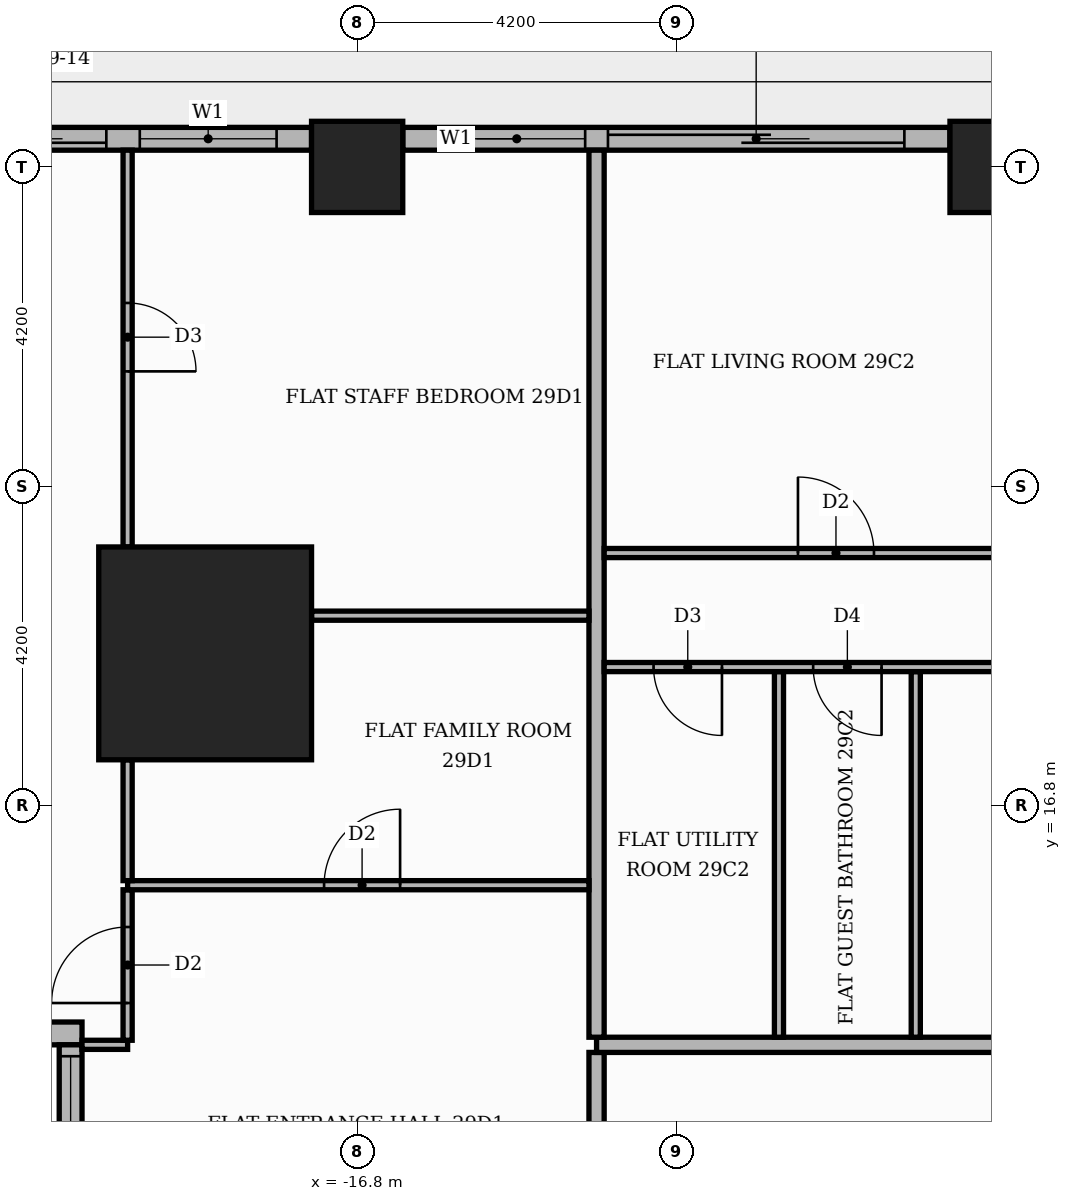
"""IFC4 building model, lengths in metres.
Left out: names, types, materials, properties, quantities, classifications, styles, units other than length and angle.
Written with IfcOpenShell. Run it as: python <this file> out.ifc"""

import sys

from ifc_helpers import new_model, si_unit, direction, frame, frame_2d, origin, origin_2d, place, context, subcontext, project, spatial, rectangle, extrude, element, fill, save


model = new_model("IFC4")
c1 = context("Model", 3, precision=1e-05, world=origin(), true_north=direction((0.0, 1.0)))
c2 = subcontext(c1, "Body", "Model", "MODEL_VIEW")
j1 = project(units=[si_unit("LENGTHUNIT", "METRE"), si_unit("PLANEANGLEUNIT", "RADIAN")], contexts=[c1])
p1 = place(None, origin())
s1 = spatial("IfcSite", under=j1, at=p1, CompositionType="ELEMENT")
p2 = place(p1, origin())
s2 = spatial("IfcBuilding", under=s1, at=p2, CompositionType="ELEMENT")
p3 = place(p2, frame((0.0, 0.0, 122.1)))
s3 = spatial("IfcBuildingStorey", under=s2, at=p3, CompositionType="ELEMENT", Elevation=122.1)
p4 = place(p3, frame((-18.8, 18.8, 0.0), z_axis=(0.0, 0.0, 1.0), x_axis=(1.0, 0.0, 0.0)))
e1 = element("IfcColumn", 1, at=p4, inside=s3, PredefinedType="COLUMN", context=c2, shape_type="SweptSolid", body=[
    extrude(rectangle(XDim=2.8, YDim=2.8, at=origin_2d()), origin(), (0.0, 0.0, 1.0), 3.9),
])
for number, where, z_axis, x_axis in (
    (2, (-8.4, 25.2, 0.0), (0.0, 0.0, 1.0), (1.0, 0.0, 0.0)),
    (3, (-16.8, 25.2, 0.0), (0.0, 0.0, 1.0), (1.0, 0.0, 0.0)),
):
    element("IfcColumn", number, at=place(p3, frame(where, z_axis=z_axis, x_axis=x_axis)), inside=s3, PredefinedType="COLUMN", context=c2, shape_type="SweptSolid", body=[
        extrude(rectangle(XDim=1.2, YDim=1.2, at=origin_2d()), origin(), (0.0, 0.0, 1.0), 3.9),
    ])
p5 = place(p3, frame((-9.0, 25.57, 0.0), z_axis=(0.0, 0.0, 1.0), x_axis=(-1.0, 0.0, 0.0)))
e4 = element("IfcWall", 4, at=p5, inside=s3, PredefinedType="STANDARD", context=c2, shape_type="SweptSolid", body=[
    extrude(rectangle(XDim=7.2, YDim=0.3, at=frame_2d((3.6, 0.0))), origin(), (0.0, 0.0, 1.0), 3.4),
])
p6 = place(p5, frame((0.6, 0.0, 0.0)))
e5 = element("IfcOpeningElement", 5, at=p6, cuts=e4, PredefinedType="OPENING", context=c2, shape_type="SweptSolid", body=[
    extrude(rectangle(XDim=3.9, YDim=2.4, at=frame_2d((1.95, 1.2))), frame((0.0, 0.16, 0.0), z_axis=(0.0, -1.0, 0.0), x_axis=(1.0, 0.0, 0.0)), (0.0, 0.0, 1.0), 0.32),
])
p7 = place(p5, frame((4.8, 0.0, 0.9)))
e6 = element("IfcOpeningElement", 6, at=p7, cuts=e4, PredefinedType="OPENING", context=c2, shape_type="SweptSolid", body=[
    extrude(rectangle(XDim=1.8, YDim=2.1, at=frame_2d((0.9, 1.05))), frame((0.0, 0.16, 0.0), z_axis=(0.0, -1.0, 0.0), x_axis=(1.0, 0.0, 0.0)), (0.0, 0.0, 1.0), 0.32),
])
p8 = place(p3, frame((-17.4, 25.57, 0.0), z_axis=(0.0, 0.0, 1.0), x_axis=(-1.0, 0.0, 0.0)))
e7 = element("IfcWall", 7, at=p8, inside=s3, PredefinedType="STANDARD", context=c2, shape_type="SweptSolid", body=[
    extrude(rectangle(XDim=4.82, YDim=0.3, at=frame_2d((2.41, 0.0))), origin(), (0.0, 0.0, 1.0), 3.4),
])
p9 = place(p8, frame((2.7, 0.0, 0.0)))
e8 = element("IfcOpeningElement", 8, at=p9, cuts=e7, PredefinedType="OPENING", context=c2, shape_type="SweptSolid", body=[
    extrude(rectangle(XDim=1.8, YDim=2.4, at=frame_2d((0.9, 1.2))), frame((0.0, 0.16, 0.0), z_axis=(0.0, -1.0, 0.0), x_axis=(1.0, 0.0, 0.0)), (0.0, 0.0, 1.0), 0.32),
])
p10 = place(p8, frame((0.46, 0.0, 0.9)))
e9 = element("IfcOpeningElement", 9, at=p10, cuts=e7, PredefinedType="OPENING", context=c2, shape_type="SweptSolid", body=[
    extrude(rectangle(XDim=1.8, YDim=2.1, at=frame_2d((0.9, 1.05))), frame((0.0, 0.16, 0.0), z_axis=(0.0, -1.0, 0.0), x_axis=(1.0, 0.0, 0.0)), (0.0, 0.0, 1.0), 0.32),
])
p11 = place(p3, frame((-25.42, 13.8, 0.0), z_axis=(0.0, 0.0, 1.0), x_axis=(1.0, 0.0, 0.0)))
e10 = element("IfcWall", 10, at=p11, inside=s3, PredefinedType="STANDARD", context=c2, shape_type="SweptSolid", body=[
    extrude(rectangle(XDim=5.0, YDim=0.3, at=frame_2d((2.5, 0.0))), origin(), (0.0, 0.0, 1.0), 3.4),
])
p12 = place(p11, frame((1.42, 0.0, 0.9)))
e11 = element("IfcOpeningElement", 11, at=p12, cuts=e10, PredefinedType="OPENING", context=c2, shape_type="SweptSolid", body=[
    extrude(rectangle(XDim=1.8, YDim=2.1, at=frame_2d((0.9, 1.05))), frame((0.0, 0.16, 0.0), z_axis=(0.0, -1.0, 0.0), x_axis=(1.0, 0.0, 0.0)), (0.0, 0.0, 1.0), 0.32),
])
p13 = place(p3, frame((-20.57, 13.65, 0.0), z_axis=(0.0, 0.0, 1.0), x_axis=(0.0, -1.0, 0.0)))
e12 = element("IfcWall", 12, at=p13, inside=s3, PredefinedType="STANDARD", context=c2, shape_type="SweptSolid", body=[
    extrude(rectangle(XDim=27.6, YDim=0.3, at=frame_2d((13.8, 0.0))), origin(), (0.0, 0.0, 1.0), 3.4),
])
p14 = place(p13, frame((0.15, 0.0, 0.9)))
e13 = element("IfcOpeningElement", 13, at=p14, cuts=e12, PredefinedType="OPENING", context=c2, shape_type="SweptSolid", body=[
    extrude(rectangle(XDim=6.0, YDim=2.1, at=frame_2d((3.0, 1.05))), frame((0.0, 0.16, 0.0), z_axis=(0.0, -1.0, 0.0), x_axis=(1.0, 0.0, 0.0)), (0.0, 0.0, 1.0), 0.32),
])
p15 = place(p13, frame((6.45, 0.0, 0.9)))
e14 = element("IfcOpeningElement", 14, at=p15, cuts=e12, PredefinedType="OPENING", context=c2, shape_type="SweptSolid", body=[
    extrude(rectangle(XDim=1.8, YDim=2.1, at=frame_2d((0.9, 1.05))), frame((0.0, 0.16, 0.0), z_axis=(0.0, -1.0, 0.0), x_axis=(1.0, 0.0, 0.0)), (0.0, 0.0, 1.0), 0.32),
])
p16 = place(p13, frame((8.55, 0.0, 0.9)))
e15 = element("IfcOpeningElement", 15, at=p16, cuts=e12, PredefinedType="OPENING", context=c2, shape_type="SweptSolid", body=[
    extrude(rectangle(XDim=6.0, YDim=2.1, at=frame_2d((3.0, 1.05))), frame((0.0, 0.16, 0.0), z_axis=(0.0, -1.0, 0.0), x_axis=(1.0, 0.0, 0.0)), (0.0, 0.0, 1.0), 0.32),
])
p17 = place(p13, frame((14.85, 0.0, 0.9)))
e16 = element("IfcOpeningElement", 16, at=p17, cuts=e12, PredefinedType="OPENING", context=c2, shape_type="SweptSolid", body=[
    extrude(rectangle(XDim=6.0, YDim=2.1, at=frame_2d((3.0, 1.05))), frame((0.0, 0.16, 0.0), z_axis=(0.0, -1.0, 0.0), x_axis=(1.0, 0.0, 0.0)), (0.0, 0.0, 1.0), 0.32),
])
p18 = place(p13, frame((21.15, 0.0, 0.9)))
e17 = element("IfcOpeningElement", 17, at=p18, cuts=e12, PredefinedType="OPENING", context=c2, shape_type="SweptSolid", body=[
    extrude(rectangle(XDim=6.0, YDim=2.1, at=frame_2d((3.0, 1.05))), frame((0.0, 0.16, 0.0), z_axis=(0.0, -1.0, 0.0), x_axis=(1.0, 0.0, 0.0)), (0.0, 0.0, 1.0), 0.32),
])
p19 = place(p3, frame((-13.65, 5.35, 0.0), z_axis=(0.0, 0.0, 1.0), x_axis=(0.0, 1.0, 0.0)))
e18 = element("IfcWall", 18, at=p19, inside=s3, PredefinedType="PARTITIONING", context=c2, shape_type="SweptSolid", body=[
    extrude(rectangle(XDim=8.2, YDim=0.2, at=frame_2d((4.1, 0.0))), origin(), (0.0, 0.0, 1.0), 3.4),
])
p20 = place(p19, frame((5.65, 0.0, 0.0)))
e19 = element("IfcOpeningElement", 19, at=p20, cuts=e18, PredefinedType="OPENING", context=c2, shape_type="SweptSolid", body=[
    extrude(rectangle(XDim=1.1, YDim=2.4, at=frame_2d((0.55, 1.2))), frame((0.0, 0.11, 0.0), z_axis=(0.0, -1.0, 0.0), x_axis=(1.0, 0.0, 0.0)), (0.0, 0.0, 1.0), 0.22),
])
p21 = place(p3, frame((-20.42, 13.65, 0.0), z_axis=(0.0, 0.0, 1.0), x_axis=(1.0, 0.0, 0.0)))
e20 = element("IfcWall", 20, at=p21, inside=s3, PredefinedType="PARTITIONING", context=c2, shape_type="SweptSolid", body=[
    extrude(rectangle(XDim=0.6, YDim=0.12, at=frame_2d((0.3, 0.0))), origin(), (0.0, 0.0, 1.0), 3.4),
])
p22 = place(p3, frame((-13.65, 13.65, 0.0), z_axis=(0.0, 0.0, 1.0), x_axis=(1.0, 0.0, 0.0)))
e21 = element("IfcWall", 21, at=p22, inside=s3, PredefinedType="PARTITIONING", context=c2, shape_type="SweptSolid", body=[
    extrude(rectangle(XDim=39.07, YDim=0.2, at=frame_2d((19.535, 0.0))), origin(), (0.0, 0.0, 1.0), 3.4),
])
p23 = place(p22, frame((24.65, 0.0, 0.0)))
e22 = element("IfcOpeningElement", 22, at=p23, cuts=e21, PredefinedType="OPENING", context=c2, shape_type="SweptSolid", body=[
    extrude(rectangle(XDim=1.1, YDim=2.4, at=frame_2d((0.55, 1.2))), frame((0.0, 0.11, 0.0), z_axis=(0.0, -1.0, 0.0), x_axis=(1.0, 0.0, 0.0)), (0.0, 0.0, 1.0), 0.22),
])
p24 = place(p22, frame((12.05, 0.0, 0.0)))
e23 = element("IfcOpeningElement", 23, at=p24, cuts=e21, PredefinedType="OPENING", context=c2, shape_type="SweptSolid", body=[
    extrude(rectangle(XDim=1.1, YDim=2.4, at=frame_2d((0.55, 1.2))), frame((0.0, 0.11, 0.0), z_axis=(0.0, -1.0, 0.0), x_axis=(1.0, 0.0, 0.0)), (0.0, 0.0, 1.0), 0.22),
])
p25 = place(p3, frame((-19.82, 13.71, 0.0), z_axis=(0.0, 0.0, 1.0), x_axis=(0.0, 1.0, 0.0)))
e24 = element("IfcWall", 24, at=p25, inside=s3, PredefinedType="PARTITIONING", context=c2, shape_type="SweptSolid", body=[
    extrude(rectangle(XDim=1.98, YDim=0.12, at=frame_2d((0.99, 0.0))), origin(), (0.0, 0.0, 1.0), 3.4),
])
p26 = place(p25, frame((0.49, 0.0, 0.0)))
e25 = element("IfcOpeningElement", 25, at=p26, cuts=e24, PredefinedType="OPENING", context=c2, shape_type="SweptSolid", body=[
    extrude(rectangle(XDim=1.0, YDim=2.1, at=frame_2d((0.5, 1.05))), frame((0.0, 0.07, 0.0), z_axis=(0.0, -1.0, 0.0), x_axis=(1.0, 0.0, 0.0)), (0.0, 0.0, 1.0), 0.14),
])
p27 = place(p3, frame((-13.65, 13.75, 0.0), z_axis=(0.0, 0.0, 1.0), x_axis=(0.0, 1.0, 0.0)))
e26 = element("IfcWall", 26, at=p27, inside=s3, PredefinedType="PARTITIONING", context=c2, shape_type="SweptSolid", body=[
    extrude(rectangle(XDim=11.67, YDim=0.2, at=frame_2d((5.835, 0.0))), origin(), (0.0, 0.0, 1.0), 3.4),
])
for number, where, z_axis, x_axis in (
    (27, (-11.25, 13.75, 0.0), (0.0, 0.0, 1.0), (0.0, 1.0, 0.0)),
    (28, (-9.45, 13.75, 0.0), (0.0, 0.0, 1.0), (0.0, 1.0, 0.0)),
):
    element("IfcWall", number, at=place(p3, frame(where, z_axis=z_axis, x_axis=x_axis)), inside=s3, PredefinedType="PARTITIONING", context=c2, shape_type="SweptSolid", body=[
        extrude(rectangle(XDim=4.81, YDim=0.12, at=frame_2d((2.405, 0.0))), origin(), (0.0, 0.0, 1.0), 3.4),
    ])
p28 = place(p3, frame((-19.82, 15.75, 0.0), z_axis=(0.0, 0.0, 1.0), x_axis=(1.0, 0.0, 0.0)))
e29 = element("IfcWall", 29, at=p28, inside=s3, PredefinedType="PARTITIONING", context=c2, shape_type="SweptSolid", body=[
    extrude(rectangle(XDim=6.07, YDim=0.12, at=frame_2d((3.035, 0.0))), origin(), (0.0, 0.0, 1.0), 3.4),
])
p29 = place(p28, frame((2.585, 0.0, 0.0)))
e30 = element("IfcOpeningElement", 30, at=p29, cuts=e29, PredefinedType="OPENING", context=c2, shape_type="SweptSolid", body=[
    extrude(rectangle(XDim=1.0, YDim=2.1, at=frame_2d((0.5, 1.05))), frame((0.0, 0.07, 0.0), z_axis=(0.0, -1.0, 0.0), x_axis=(1.0, 0.0, 0.0)), (0.0, 0.0, 1.0), 0.14),
])
p30 = place(p3, frame((-19.82, 15.81, 0.0), z_axis=(0.0, 0.0, 1.0), x_axis=(0.0, 1.0, 0.0)))
e31 = element("IfcWall", 31, at=p30, inside=s3, PredefinedType="PARTITIONING", context=c2, shape_type="SweptSolid", body=[
    extrude(rectangle(XDim=1.59, YDim=0.12, at=frame_2d((0.795, 0.0))), origin(), (0.0, 0.0, 1.0), 3.4),
])
p31 = place(p3, frame((-13.55, 18.62, 0.0), z_axis=(0.0, 0.0, 1.0), x_axis=(1.0, 0.0, 0.0)))
e32 = element("IfcWall", 32, at=p31, inside=s3, PredefinedType="PARTITIONING", context=c2, shape_type="SweptSolid", body=[
    extrude(rectangle(XDim=10.4, YDim=0.12, at=frame_2d((5.2, 0.0))), origin(), (0.0, 0.0, 1.0), 3.4),
])
p32 = place(p31, frame((6.8, 0.0, 0.0)))
e33 = element("IfcOpeningElement", 33, at=p32, cuts=e32, PredefinedType="OPENING", context=c2, shape_type="SweptSolid", body=[
    extrude(rectangle(XDim=0.9, YDim=2.1, at=frame_2d((0.45, 1.05))), frame((0.0, 0.07, 0.0), z_axis=(0.0, -1.0, 0.0), x_axis=(1.0, 0.0, 0.0)), (0.0, 0.0, 1.0), 0.14),
])
p33 = place(p31, frame((2.75, 0.0, 0.0)))
e34 = element("IfcOpeningElement", 34, at=p33, cuts=e32, PredefinedType="OPENING", context=c2, shape_type="SweptSolid", body=[
    extrude(rectangle(XDim=0.9, YDim=2.1, at=frame_2d((0.45, 1.05))), frame((0.0, 0.07, 0.0), z_axis=(0.0, -1.0, 0.0), x_axis=(1.0, 0.0, 0.0)), (0.0, 0.0, 1.0), 0.14),
])
p34 = place(p31, frame((0.65, 0.0, 0.0)))
e35 = element("IfcOpeningElement", 35, at=p34, cuts=e32, PredefinedType="OPENING", context=c2, shape_type="SweptSolid", body=[
    extrude(rectangle(XDim=0.9, YDim=2.1, at=frame_2d((0.45, 1.05))), frame((0.0, 0.07, 0.0), z_axis=(0.0, -1.0, 0.0), x_axis=(1.0, 0.0, 0.0)), (0.0, 0.0, 1.0), 0.14),
])
p35 = place(p3, frame((-17.4, 19.296, 0.0), z_axis=(0.0, 0.0, 1.0), x_axis=(1.0, 0.0, 0.0)))
e36 = element("IfcWall", 36, at=p35, inside=s3, PredefinedType="PARTITIONING", context=c2, shape_type="SweptSolid", body=[
    extrude(rectangle(XDim=3.65, YDim=0.12, at=frame_2d((1.825, 0.0))), origin(), (0.0, 0.0, 1.0), 3.4),
])
p36 = place(p3, frame((-13.55, 20.12, 0.0), z_axis=(0.0, 0.0, 1.0), x_axis=(1.0, 0.0, 0.0)))
e37 = element("IfcWall", 37, at=p36, inside=s3, PredefinedType="PARTITIONING", context=c2, shape_type="SweptSolid", body=[
    extrude(rectangle(XDim=18.7, YDim=0.12, at=frame_2d((9.35, 0.0))), origin(), (0.0, 0.0, 1.0), 3.4),
])
p37 = place(p36, frame((14.15, 0.0, 0.0)))
e38 = element("IfcOpeningElement", 38, at=p37, cuts=e37, PredefinedType="OPENING", context=c2, shape_type="SweptSolid", body=[
    extrude(rectangle(XDim=0.9, YDim=2.1, at=frame_2d((0.45, 1.05))), frame((0.0, 0.07, 0.0), z_axis=(0.0, -1.0, 0.0), x_axis=(1.0, 0.0, 0.0)), (0.0, 0.0, 1.0), 0.14),
])
p38 = place(p36, frame((2.55, 0.0, 0.0)))
e39 = element("IfcOpeningElement", 39, at=p38, cuts=e37, PredefinedType="OPENING", context=c2, shape_type="SweptSolid", body=[
    extrude(rectangle(XDim=1.0, YDim=2.1, at=frame_2d((0.5, 1.05))), frame((0.0, 0.07, 0.0), z_axis=(0.0, -1.0, 0.0), x_axis=(1.0, 0.0, 0.0)), (0.0, 0.0, 1.0), 0.14),
])
p39 = place(p3, frame((-19.82, 20.2, 0.0), z_axis=(0.0, 0.0, 1.0), x_axis=(0.0, 1.0, 0.0)))
e40 = element("IfcWall", 40, at=p39, inside=s3, PredefinedType="PARTITIONING", context=c2, shape_type="SweptSolid", body=[
    extrude(rectangle(XDim=5.22, YDim=0.12, at=frame_2d((2.61, 0.0))), origin(), (0.0, 0.0, 1.0), 3.4),
])
p40 = place(p39, frame((2.31, 0.0, 0.0)))
e41 = element("IfcOpeningElement", 41, at=p40, cuts=e40, PredefinedType="OPENING", context=c2, shape_type="SweptSolid", body=[
    extrude(rectangle(XDim=0.9, YDim=2.1, at=frame_2d((0.45, 1.05))), frame((0.0, 0.07, 0.0), z_axis=(0.0, -1.0, 0.0), x_axis=(1.0, 0.0, 0.0)), (0.0, 0.0, 1.0), 0.14),
])
p41 = place(p6, origin())
e42 = element("IfcDoor", 42, at=p41, inside=s3, OperationType="SLIDING_TO_LEFT", PredefinedType="DOOR", context=c2, shape_type="SweptSolid", body=[
    extrude(rectangle(XDim=3.9, YDim=2.4, at=frame_2d((1.95, 1.2))), frame((0.0, 0.025, 0.0), z_axis=(0.0, -1.0, 0.0), x_axis=(1.0, 0.0, 0.0)), (0.0, 0.0, 1.0), 0.05),
])
fill(e5, e42)
p42 = place(p7, origin())
e43 = element("IfcWindow", 43, at=p42, inside=s3, PartitioningType="SINGLE_PANEL", PredefinedType="WINDOW", context=c2, shape_type="SweptSolid", body=[
    extrude(rectangle(XDim=1.8, YDim=2.1, at=frame_2d((0.9, 1.05))), frame((0.0, 0.03, 0.0), z_axis=(0.0, -1.0, 0.0), x_axis=(1.0, 0.0, 0.0)), (0.0, 0.0, 1.0), 0.06),
])
fill(e6, e43)
p43 = place(p9, origin())
e44 = element("IfcDoor", 44, at=p43, inside=s3, OperationType="SLIDING_TO_LEFT", PredefinedType="DOOR", context=c2, shape_type="SweptSolid", body=[
    extrude(rectangle(XDim=1.8, YDim=2.4, at=frame_2d((0.9, 1.2))), frame((0.0, 0.025, 0.0), z_axis=(0.0, -1.0, 0.0), x_axis=(1.0, 0.0, 0.0)), (0.0, 0.0, 1.0), 0.05),
])
fill(e8, e44)
p44 = place(p10, origin())
e45 = element("IfcWindow", 45, at=p44, inside=s3, PartitioningType="SINGLE_PANEL", PredefinedType="WINDOW", context=c2, shape_type="SweptSolid", body=[
    extrude(rectangle(XDim=1.8, YDim=2.1, at=frame_2d((0.9, 1.05))), frame((0.0, 0.03, 0.0), z_axis=(0.0, -1.0, 0.0), x_axis=(1.0, 0.0, 0.0)), (0.0, 0.0, 1.0), 0.06),
])
fill(e9, e45)
p45 = place(p14, origin())
e46 = element("IfcWindow", 46, at=p45, inside=s3, PartitioningType="SINGLE_PANEL", PredefinedType="WINDOW", context=c2, shape_type="SweptSolid", body=[
    extrude(rectangle(XDim=6.0, YDim=2.1, at=frame_2d((3.0, 1.05))), frame((0.0, 0.03, 0.0), z_axis=(0.0, -1.0, 0.0), x_axis=(1.0, 0.0, 0.0)), (0.0, 0.0, 1.0), 0.06),
])
fill(e13, e46)
p46 = place(p33, frame((0.9, 0.0, 0.0), z_axis=(0.0, 0.0, 1.0), x_axis=(-1.0, 0.0, 0.0)))
e47 = element("IfcDoor", 47, at=p46, inside=s3, OperationType="SINGLE_SWING_RIGHT", PredefinedType="DOOR", context=c2, shape_type="SweptSolid", body=[
    extrude(rectangle(XDim=0.9, YDim=2.1, at=frame_2d((0.45, 1.05))), frame((0.0, 0.025, 0.0), z_axis=(0.0, -1.0, 0.0), x_axis=(1.0, 0.0, 0.0)), (0.0, 0.0, 1.0), 0.05),
])
fill(e34, e47)
p47 = place(p34, frame((0.9, 0.0, 0.0), z_axis=(0.0, 0.0, 1.0), x_axis=(-1.0, 0.0, 0.0)))
e48 = element("IfcDoor", 48, at=p47, inside=s3, OperationType="SINGLE_SWING_RIGHT", PredefinedType="DOOR", context=c2, shape_type="SweptSolid", body=[
    extrude(rectangle(XDim=0.9, YDim=2.1, at=frame_2d((0.45, 1.05))), frame((0.0, 0.025, 0.0), z_axis=(0.0, -1.0, 0.0), x_axis=(1.0, 0.0, 0.0)), (0.0, 0.0, 1.0), 0.05),
])
fill(e35, e48)
p48 = place(p38, origin())
e49 = element("IfcDoor", 49, at=p48, inside=s3, OperationType="SINGLE_SWING_LEFT", PredefinedType="DOOR", context=c2, shape_type="SweptSolid", body=[
    extrude(rectangle(XDim=1.0, YDim=2.1, at=frame_2d((0.5, 1.05))), frame((0.0, 0.025, 0.0), z_axis=(0.0, -1.0, 0.0), x_axis=(1.0, 0.0, 0.0)), (0.0, 0.0, 1.0), 0.05),
])
fill(e39, e49)
p49 = place(p40, frame((0.9, 0.0, 0.0), z_axis=(0.0, 0.0, 1.0), x_axis=(-1.0, 0.0, 0.0)))
e50 = element("IfcDoor", 50, at=p49, inside=s3, OperationType="SINGLE_SWING_LEFT", PredefinedType="DOOR", context=c2, shape_type="SweptSolid", body=[
    extrude(rectangle(XDim=0.9, YDim=2.1, at=frame_2d((0.45, 1.05))), frame((0.0, 0.025, 0.0), z_axis=(0.0, -1.0, 0.0), x_axis=(1.0, 0.0, 0.0)), (0.0, 0.0, 1.0), 0.05),
])
fill(e41, e50)
p50 = place(p29, origin())
e51 = element("IfcDoor", 51, at=p50, inside=s3, OperationType="SINGLE_SWING_RIGHT", PredefinedType="DOOR", context=c2, shape_type="SweptSolid", body=[
    extrude(rectangle(XDim=1.0, YDim=2.1, at=frame_2d((0.5, 1.05))), frame((0.0, 0.025, 0.0), z_axis=(0.0, -1.0, 0.0), x_axis=(1.0, 0.0, 0.0)), (0.0, 0.0, 1.0), 0.05),
])
fill(e30, e51)
p51 = place(p26, origin())
e52 = element("IfcDoor", 52, at=p51, inside=s3, OperationType="SINGLE_SWING_LEFT", PredefinedType="DOOR", context=c2, shape_type="SweptSolid", body=[
    extrude(rectangle(XDim=1.0, YDim=2.1, at=frame_2d((0.5, 1.05))), frame((0.0, 0.025, 0.0), z_axis=(0.0, -1.0, 0.0), x_axis=(1.0, 0.0, 0.0)), (0.0, 0.0, 1.0), 0.05),
])
fill(e25, e52)
save(model, sys.argv[1])
